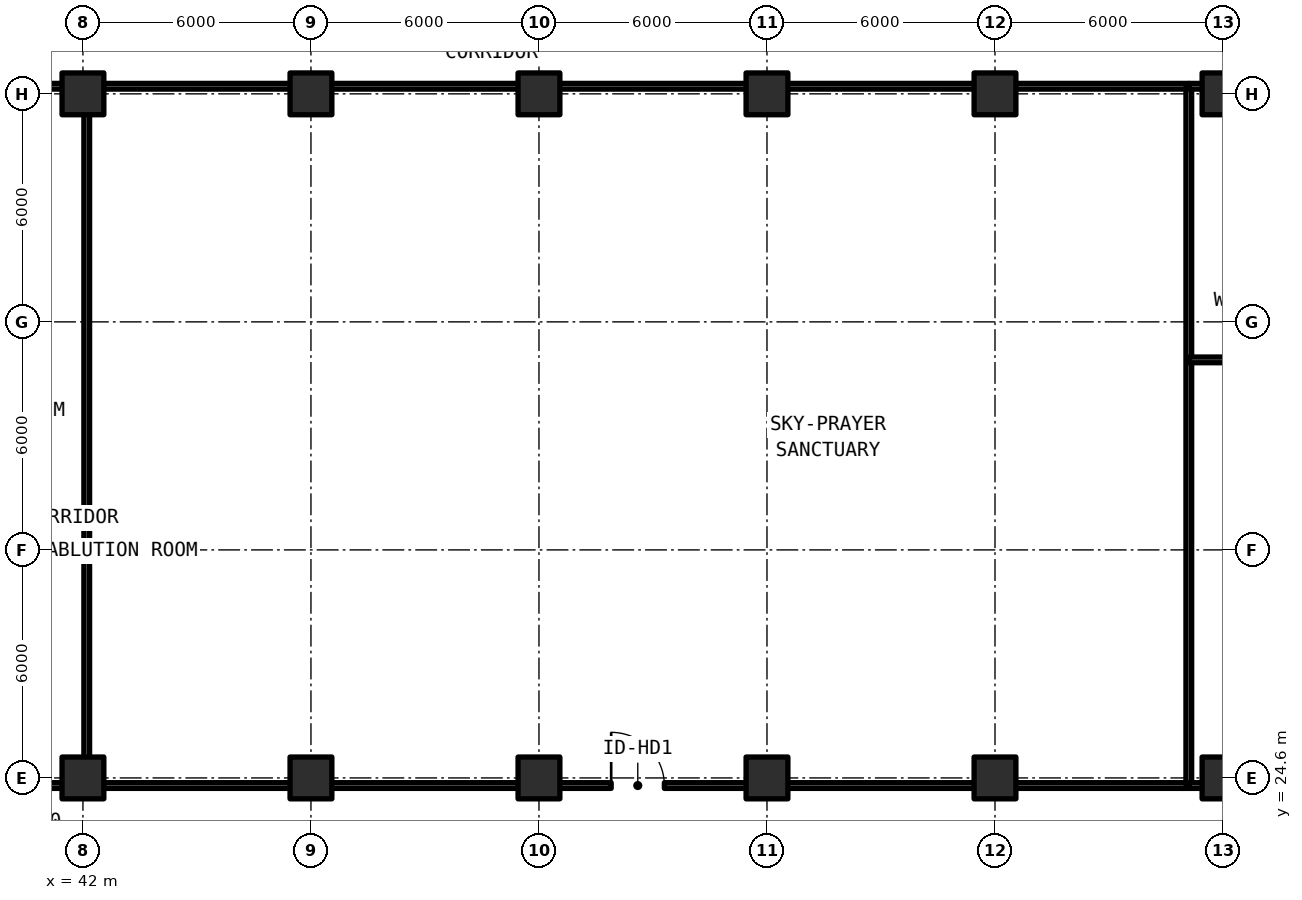
"""IFC4 building model, lengths in metres.
Left out: names, types, materials, properties, quantities, classifications, styles, units other than length and angle.
Written with IfcOpenShell. Run it as: python <this file> out.ifc"""

import sys

from ifc_helpers import new_model, si_unit, direction, frame, frame_2d, origin, origin_2d, place, context, subcontext, project, spatial, rectangle, extrude, element, fill, save


model = new_model("IFC4")
c1 = context("Model", 3, precision=1e-05, world=origin(), true_north=direction((0.0, 1.0)))
c2 = subcontext(c1, "Body", "Model", "MODEL_VIEW")
j1 = project(units=[si_unit("LENGTHUNIT", "METRE"), si_unit("PLANEANGLEUNIT", "RADIAN")], contexts=[c1])
p1 = place(None, origin())
s1 = spatial("IfcSite", under=j1, at=p1, CompositionType="ELEMENT")
p2 = place(p1, origin())
s2 = spatial("IfcBuilding", under=s1, at=p2, CompositionType="ELEMENT")
p3 = place(p2, frame((0.0, 0.0, 66.0)))
s3 = spatial("IfcBuildingStorey", under=s2, at=p3, CompositionType="ELEMENT", Elevation=66.0)
for number, where, z_axis, x_axis in (
    (1, (42.0, 24.6, 0.0), (0.0, 0.0, 1.0), (1.0, 0.0, 0.0)),
    (2, (42.0, 42.6, 0.0), (0.0, 0.0, 1.0), (1.0, 0.0, 0.0)),
    (3, (48.0, 24.6, 0.0), (0.0, 0.0, 1.0), (1.0, 0.0, 0.0)),
    (4, (48.0, 42.6, 0.0), (0.0, 0.0, 1.0), (1.0, 0.0, 0.0)),
    (5, (54.0, 24.6, 0.0), (0.0, 0.0, 1.0), (1.0, 0.0, 0.0)),
    (6, (54.0, 42.6, 0.0), (0.0, 0.0, 1.0), (1.0, 0.0, 0.0)),
    (7, (60.0, 24.6, 0.0), (0.0, 0.0, 1.0), (1.0, 0.0, 0.0)),
    (8, (60.0, 42.6, 0.0), (0.0, 0.0, 1.0), (1.0, 0.0, 0.0)),
    (9, (66.0, 24.6, 0.0), (0.0, 0.0, 1.0), (1.0, 0.0, 0.0)),
    (10, (66.0, 42.6, 0.0), (0.0, 0.0, 1.0), (1.0, 0.0, 0.0)),
    (11, (72.0, 24.6, 0.0), (0.0, 0.0, 1.0), (1.0, 0.0, 0.0)),
    (12, (72.0, 42.6, 0.0), (0.0, 0.0, 1.0), (1.0, 0.0, 0.0)),
):
    element("IfcColumn", number, at=place(p3, frame(where, z_axis=z_axis, x_axis=x_axis)), inside=s3, PredefinedType="COLUMN", context=c2, shape_type="SweptSolid", body=[
        extrude(rectangle(XDim=1.1, YDim=1.1, at=origin_2d()), origin(), (0.0, 0.0, 1.0), 3.63),
    ])
p4 = place(p3, frame((38.6, 24.4, 0.0), z_axis=(0.0, 0.0, 1.0), x_axis=(1.0, 0.0, 0.0)))
e13 = element("IfcWall", 13, at=p4, inside=s3, PredefinedType="SOLIDWALL", context=c2, shape_type="SweptSolid", body=[
    extrude(rectangle(XDim=3.5, YDim=0.15, at=frame_2d((1.75, 0.0))), origin(), (0.0, 0.0, 1.0), 2.625),
])
p5 = place(p3, frame((38.6, 31.4, 0.0), z_axis=(0.0, 0.0, 1.0), x_axis=(1.0, 0.0, 0.0)))
e14 = element("IfcWall", 14, at=p5, inside=s3, PredefinedType="SOLIDWALL", context=c2, shape_type="SweptSolid", body=[
    extrude(rectangle(XDim=3.5, YDim=0.15, at=frame_2d((1.75, 0.0))), origin(), (0.0, 0.0, 1.0), 2.63),
])
p6 = place(p3, frame((38.6, 42.8, 0.0), z_axis=(0.0, 0.0, 1.0), x_axis=(1.0, 0.0, 0.0)))
e15 = element("IfcWall", 15, at=p6, inside=s3, PredefinedType="SOLIDWALL", context=c2, shape_type="SweptSolid", body=[
    extrude(rectangle(XDim=3.5, YDim=0.15, at=frame_2d((1.75, 0.0))), origin(), (0.0, 0.0, 1.0), 2.625),
])
p7 = place(p3, frame((42.1, 24.4, 0.0), z_axis=(0.0, 0.0, 1.0), x_axis=(1.0, 0.0, 0.0)))
e16 = element("IfcWall", 16, at=p7, inside=s3, PredefinedType="SOLIDWALL", context=c2, shape_type="SweptSolid", body=[
    extrude(rectangle(XDim=29.0, YDim=0.15, at=frame_2d((14.5, 0.0))), origin(), (0.0, 0.0, 1.0), 2.625),
])
p8 = place(p7, frame((13.8, 0.0, 0.0)))
e17 = element("IfcOpeningElement", 17, at=p8, cuts=e16, PredefinedType="OPENING", context=c2, shape_type="SweptSolid", body=[
    extrude(rectangle(XDim=1.4, YDim=2.15, at=frame_2d((0.7, 1.075))), frame((0.0, 0.085, 0.0), z_axis=(0.0, -1.0, 0.0), x_axis=(1.0, 0.0, 0.0)), (0.0, 0.0, 1.0), 0.17),
])
p9 = place(p3, frame((42.1, 42.8, 0.0), z_axis=(0.0, 0.0, 1.0), x_axis=(1.0, 0.0, 0.0)))
e18 = element("IfcWall", 18, at=p9, inside=s3, PredefinedType="SOLIDWALL", context=c2, shape_type="SweptSolid", body=[
    extrude(rectangle(XDim=29.0, YDim=0.15, at=frame_2d((14.5, 0.0))), origin(), (0.0, 0.0, 1.0), 2.625),
])
for number, where, z_axis, x_axis in (
    (19, (42.1, 24.4, 0.0), (0.0, 0.0, 1.0), (0.0, 1.0, 0.0)),
    (20, (71.1, 24.4, 0.0), (0.0, 0.0, 1.0), (0.0, 1.0, 0.0)),
):
    element("IfcWall", number, at=place(p3, frame(where, z_axis=z_axis, x_axis=x_axis)), inside=s3, PredefinedType="SOLIDWALL", context=c2, shape_type="SweptSolid", body=[
        extrude(rectangle(XDim=18.4, YDim=0.15, at=frame_2d((9.2, 0.0))), origin(), (0.0, 0.0, 1.0), 2.63),
    ])
p10 = place(p3, frame((71.1, 24.4, 0.0), z_axis=(0.0, 0.0, 1.0), x_axis=(1.0, 0.0, 0.0)))
e21 = element("IfcWall", 21, at=p10, inside=s3, PredefinedType="SOLIDWALL", context=c2, shape_type="SweptSolid", body=[
    extrude(rectangle(XDim=4.3, YDim=0.15, at=frame_2d((2.15, 0.0))), origin(), (0.0, 0.0, 1.0), 2.625),
])
p11 = place(p3, frame((71.1, 35.6, 0.0), z_axis=(0.0, 0.0, 1.0), x_axis=(1.0, 0.0, 0.0)))
e22 = element("IfcWall", 22, at=p11, inside=s3, PredefinedType="SOLIDWALL", context=c2, shape_type="SweptSolid", body=[
    extrude(rectangle(XDim=4.3, YDim=0.15, at=frame_2d((2.15, 0.0))), origin(), (0.0, 0.0, 1.0), 2.63),
])
p12 = place(p3, frame((71.1, 42.8, 0.0), z_axis=(0.0, 0.0, 1.0), x_axis=(1.0, 0.0, 0.0)))
e23 = element("IfcWall", 23, at=p12, inside=s3, PredefinedType="SOLIDWALL", context=c2, shape_type="SweptSolid", body=[
    extrude(rectangle(XDim=4.3, YDim=0.15, at=frame_2d((2.15, 0.0))), origin(), (0.0, 0.0, 1.0), 2.625),
])
p13 = place(p8, origin())
e24 = element("IfcDoor", 24, at=p13, inside=s3, OperationType="SINGLE_SWING_RIGHT", PredefinedType="DOOR", context=c2, shape_type="SweptSolid", body=[
    extrude(rectangle(XDim=1.4, YDim=2.15, at=frame_2d((0.7, 1.075))), frame((0.0, 0.025, 0.0), z_axis=(0.0, -1.0, 0.0), x_axis=(1.0, 0.0, 0.0)), (0.0, 0.0, 1.0), 0.05),
])
fill(e17, e24)
save(model, sys.argv[1])
